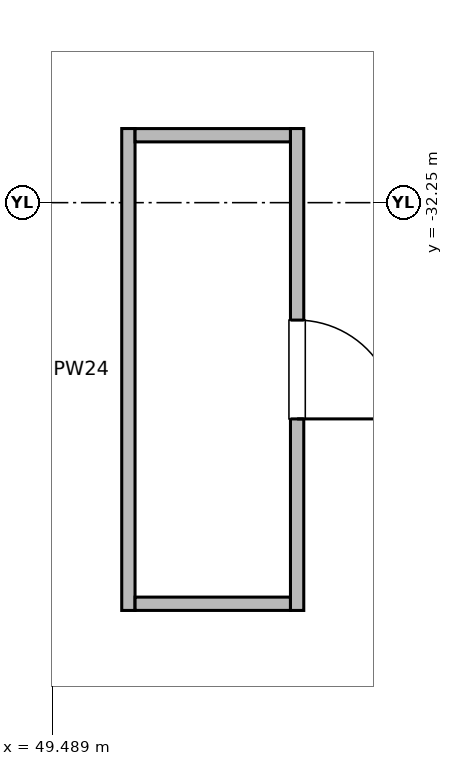
"""IFC4 building model, lengths in metres.
Left out: names, types, materials, properties, quantities, classifications, styles, units other than length and angle.
Written with IfcOpenShell. Run it as: python <this file> out.ifc"""

import sys

from ifc_helpers import new_model, si_unit, direction, frame, frame_2d, origin, place, context, subcontext, project, spatial, rectangle, extrude, element, fill, save


model = new_model("IFC4")
c1 = context("Model", 3, precision=1e-05, world=origin(), true_north=direction((0.0, 1.0)))
c2 = subcontext(c1, "Body", "Model", "MODEL_VIEW")
j1 = project(units=[si_unit("LENGTHUNIT", "METRE"), si_unit("PLANEANGLEUNIT", "RADIAN")], contexts=[c1])
p1 = place(None, origin())
s1 = spatial("IfcSite", under=j1, at=p1, CompositionType="ELEMENT")
p2 = place(p1, origin())
s2 = spatial("IfcBuilding", under=s1, at=p2, CompositionType="ELEMENT")
p3 = place(p2, frame((0.0, 0.0, -6.0)))
s3 = spatial("IfcBuildingStorey", under=s2, at=p3, CompositionType="ELEMENT", Elevation=-6.0)
p4 = place(p3, frame((52.713, -31.275, 0.0), z_axis=(0.0, 0.0, 1.0), x_axis=(0.0, -1.0, 0.0)))
e1 = element("IfcWall", 1, at=p4, inside=s3, PredefinedType="PARTITIONING", context=c2, shape_type="SweptSolid", body=[
    extrude(rectangle(XDim=6.34, YDim=0.175, at=frame_2d((3.17, 0.0))), origin(), (0.0, 0.0, 1.0), 5.02),
])
p5 = place(p4, frame((2.52, 0.0, 0.0)))
e2 = element("IfcOpeningElement", 2, at=p5, cuts=e1, PredefinedType="OPENING", context=c2, shape_type="SweptSolid", body=[
    extrude(rectangle(XDim=1.3, YDim=2.3, at=frame_2d((0.65, 1.15))), frame((0.0, 0.097, 0.0), z_axis=(0.0, -1.0, 0.0), x_axis=(1.0, 0.0, 0.0)), (0.0, 0.0, 1.0), 0.195),
])
p6 = place(p3, frame((50.493, -37.615, 0.0), z_axis=(0.0, 0.0, 1.0), x_axis=(0.0, 1.0, 0.0)))
e3 = element("IfcWall", 3, at=p6, inside=s3, PredefinedType="PARTITIONING", context=c2, shape_type="SweptSolid", body=[
    extrude(rectangle(XDim=6.34, YDim=0.175, at=frame_2d((3.17, 0.0))), origin(), (0.0, 0.0, 1.0), 5.02),
])
for number, where, z_axis, x_axis in (
    (4, (50.581, -37.527, 0.0), (0.0, 0.0, 1.0), (1.0, 0.0, 0.0)),
    (5, (50.581, -31.363, 0.0), (0.0, 0.0, 1.0), (1.0, 0.0, 0.0)),
):
    element("IfcWall", number, at=place(p3, frame(where, z_axis=z_axis, x_axis=x_axis)), inside=s3, PredefinedType="PARTITIONING", context=c2, shape_type="SweptSolid", body=[
        extrude(rectangle(XDim=2.044, YDim=0.175, at=frame_2d((1.022, 0.0))), origin(), (0.0, 0.0, 1.0), 5.02),
    ])
p7 = place(p5, origin())
e6 = element("IfcDoor", 6, at=p7, inside=s3, OperationType="SINGLE_SWING_RIGHT", PredefinedType="DOOR", context=c2, shape_type="SweptSolid", body=[
    extrude(rectangle(XDim=1.3, YDim=2.3, at=frame_2d((0.65, 1.15))), frame((0.0, 0.025, 0.0), z_axis=(0.0, -1.0, 0.0), x_axis=(1.0, 0.0, 0.0)), (0.0, 0.0, 1.0), 0.05),
])
fill(e2, e6)
save(model, sys.argv[1])
